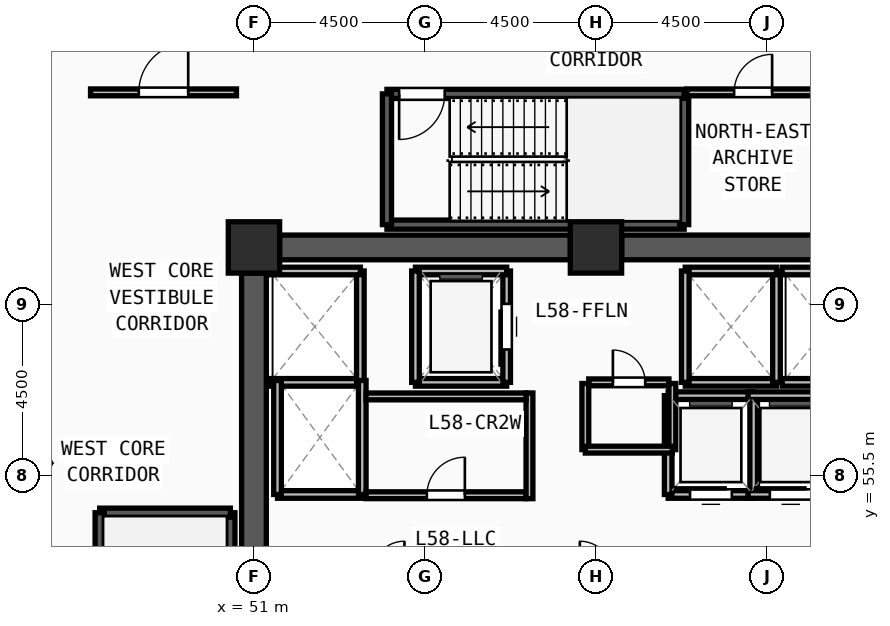
"""IFC4 building model, lengths in metres.
Left out: names, types, materials, properties, quantities, classifications, styles, units other than length and angle.
Written with IfcOpenShell. Run it as: python <this file> out.ifc"""

import sys

from ifc_helpers import new_model, si_unit, direction, frame, frame_2d, origin, origin_2d, place, context, subcontext, project, spatial, rectangle, extrude, source, transform, mapped, element, fill, save


model = new_model("IFC4")
c1 = context("Model", 3, precision=1e-05, world=origin(), true_north=direction((0.0, 1.0)))
c2 = subcontext(c1, "Body", "Model", "MODEL_VIEW")
j1 = project(units=[si_unit("LENGTHUNIT", "METRE"), si_unit("PLANEANGLEUNIT", "RADIAN")], contexts=[c1])
p1 = place(None, origin())
s1 = spatial("IfcSite", under=j1, at=p1, CompositionType="ELEMENT")
p2 = place(p1, origin())
s2 = spatial("IfcBuilding", under=s1, at=p2, CompositionType="ELEMENT")
p3 = place(p2, frame((0.0, 0.0, 224.25)))
s3 = spatial("IfcBuildingStorey", under=s2, at=p3, CompositionType="ELEMENT", Elevation=224.25)
m1 = source(origin(), c2, "Body", "SweptSolid", [
    extrude(rectangle(XDim=1.35, YDim=1.35, at=origin_2d()), origin(), (0.0, 0.0, 1.0), 3.75),
])
for number, where, z_axis, x_axis in (
    (1, (60.0, 61.5, 0.0), (0.0, 0.0, 1.0), (1.0, 0.0, 0.0)),
    (2, (51.0, 61.5, 0.0), (0.0, 0.0, 1.0), (1.0, 0.0, 0.0)),
):
    element("IfcColumn", number, at=place(p3, frame(where, z_axis=z_axis, x_axis=x_axis)), inside=s3, PredefinedType="COLUMN", context=c2, shape_type="MappedRepresentation", body=[
        mapped(m1, transform((0.0, 0.0, 0.0), x_axis=(1.0, 0.0, 0.0), y_axis=(0.0, 1.0, 0.0), z_axis=(0.0, 0.0, 1.0), scale=1.0)),
    ])
for number, where, z_axis, x_axis in (
    (3, (51.675, 61.5, 0.0), (0.0, 0.0, 1.0), (1.0, 0.0, 0.0)),
    (4, (60.675, 61.5, 0.0), (0.0, 0.0, 1.0), (1.0, 0.0, 0.0)),
):
    element("IfcWall", number, at=place(p3, frame(where, z_axis=z_axis, x_axis=x_axis)), inside=s3, PredefinedType="SHEAR", context=c2, shape_type="SweptSolid", body=[
        extrude(rectangle(XDim=7.65, YDim=0.65, at=frame_2d((3.825, 0.0))), origin(), (0.0, 0.0, 1.0), 3.57),
    ])
p4 = place(p3, frame((51.0, 47.175, 0.0), z_axis=(0.0, 0.0, 1.0), x_axis=(0.0, 1.0, 0.0)))
e5 = element("IfcWall", 5, at=p4, inside=s3, PredefinedType="SHEAR", context=c2, shape_type="SweptSolid", body=[
    extrude(rectangle(XDim=13.65, YDim=0.65, at=frame_2d((6.825, 0.0))), origin(), (0.0, 0.0, 1.0), 3.57),
])
p5 = place(p3, frame((50.38, 46.7, 0.0), z_axis=(0.0, 0.0, 1.0), x_axis=(0.0, 1.0, 0.0)))
e6 = element("IfcWall", 6, at=p5, inside=s3, PredefinedType="SOLIDWALL", context=c2, shape_type="SweptSolid", body=[
    extrude(rectangle(XDim=7.82, YDim=0.24, at=frame_2d((3.91, 0.0))), origin(), (0.0, 0.0, 1.0), 3.57),
])
p6 = place(p3, frame((50.38, 54.52, 0.0), z_axis=(0.0, 0.0, 1.0), x_axis=(-1.0, 0.0, 0.0)))
e7 = element("IfcWall", 7, at=p6, inside=s3, PredefinedType="SOLIDWALL", context=c2, shape_type="SweptSolid", body=[
    extrude(rectangle(XDim=3.44, YDim=0.24, at=frame_2d((1.72, 0.0))), origin(), (0.0, 0.0, 1.0), 3.57),
])
p7 = place(p3, frame((46.94, 54.52, 0.0), z_axis=(0.0, 0.0, 1.0), x_axis=(0.0, -1.0, 0.0)))
e8 = element("IfcWall", 8, at=p7, inside=s3, PredefinedType="SOLIDWALL", context=c2, shape_type="SweptSolid", body=[
    extrude(rectangle(XDim=7.82, YDim=0.24, at=frame_2d((3.91, 0.0))), origin(), (0.0, 0.0, 1.0), 3.57),
])
m2 = source(origin(), c2, "Body", "SweptSolid", [
    extrude(rectangle(XDim=1.2, YDim=2.2, at=frame_2d((0.6, 1.1))), frame((0.0, 0.13, 0.0), z_axis=(0.0, -1.0, 0.0), x_axis=(1.0, 0.0, 0.0)), (0.0, 0.0, 1.0), 0.26),
])
p8 = place(p7, frame((6.3, 0.0, 0.0)))
e9 = element("IfcOpeningElement", 9, at=p8, cuts=e8, PredefinedType="OPENING", context=c2, shape_type="MappedRepresentation", body=[
    mapped(m2, transform((0.0, 0.0, 0.0), x_axis=(1.0, 0.0, 0.0), y_axis=(0.0, 1.0, 0.0), z_axis=(0.0, 0.0, 1.0), scale=1.0)),
])
p9 = place(p3, frame((54.5, 62.1, 0.0), z_axis=(0.0, 0.0, 1.0), x_axis=(1.0, 0.0, 0.0)))
e10 = element("IfcWall", 10, at=p9, inside=s3, PredefinedType="SOLIDWALL", context=c2, shape_type="SweptSolid", body=[
    extrude(rectangle(XDim=7.82, YDim=0.24, at=frame_2d((3.91, 0.0))), origin(), (0.0, 0.0, 1.0), 3.57),
])
p10 = place(p3, frame((62.32, 62.1, 0.0), z_axis=(0.0, 0.0, 1.0), x_axis=(0.0, 1.0, 0.0)))
e11 = element("IfcWall", 11, at=p10, inside=s3, PredefinedType="SOLIDWALL", context=c2, shape_type="SweptSolid", body=[
    extrude(rectangle(XDim=3.44, YDim=0.24, at=frame_2d((1.72, 0.0))), origin(), (0.0, 0.0, 1.0), 3.57),
])
p11 = place(p3, frame((62.32, 65.54, 0.0), z_axis=(0.0, 0.0, 1.0), x_axis=(-1.0, 0.0, 0.0)))
e12 = element("IfcWall", 12, at=p11, inside=s3, PredefinedType="SOLIDWALL", context=c2, shape_type="SweptSolid", body=[
    extrude(rectangle(XDim=7.82, YDim=0.24, at=frame_2d((3.91, 0.0))), origin(), (0.0, 0.0, 1.0), 3.57),
])
p12 = place(p11, frame((6.3, 0.0, 0.0)))
e13 = element("IfcOpeningElement", 13, at=p12, cuts=e12, PredefinedType="OPENING", context=c2, shape_type="MappedRepresentation", body=[
    mapped(m2, transform((0.0, 0.0, 0.0), x_axis=(1.0, 0.0, 0.0), y_axis=(0.0, 1.0, 0.0), z_axis=(0.0, 0.0, 1.0), scale=1.0)),
])
p13 = place(p3, frame((54.5, 65.54, 0.0), z_axis=(0.0, 0.0, 1.0), x_axis=(0.0, -1.0, 0.0)))
e14 = element("IfcWall", 14, at=p13, inside=s3, PredefinedType="SOLIDWALL", context=c2, shape_type="SweptSolid", body=[
    extrude(rectangle(XDim=3.44, YDim=0.24, at=frame_2d((1.72, 0.0))), origin(), (0.0, 0.0, 1.0), 3.57),
])
p14 = place(p3, frame((55.25, 57.95, 0.0), z_axis=(0.0, 0.0, 1.0), x_axis=(1.0, 0.0, 0.0)))
e15 = element("IfcWall", 15, at=p14, inside=s3, PredefinedType="SOLIDWALL", context=c2, shape_type="SweptSolid", body=[
    extrude(rectangle(XDim=2.4, YDim=0.2, at=frame_2d((1.2, 0.0))), origin(), (0.0, 0.0, 1.0), 3.57),
])
p15 = place(p3, frame((57.65, 57.95, 0.0), z_axis=(0.0, 0.0, 1.0), x_axis=(0.0, 1.0, 0.0)))
e16 = element("IfcWall", 16, at=p15, inside=s3, PredefinedType="SOLIDWALL", context=c2, shape_type="SweptSolid", body=[
    extrude(rectangle(XDim=2.93, YDim=0.2, at=frame_2d((1.465, 0.0))), origin(), (0.0, 0.0, 1.0), 3.57),
])
m3 = source(origin(), c2, "Body", "SweptSolid", [
    extrude(rectangle(XDim=1.2, YDim=2.3, at=frame_2d((0.6, 1.15))), frame((0.0, 0.11, 0.0), z_axis=(0.0, -1.0, 0.0), x_axis=(1.0, 0.0, 0.0)), (0.0, 0.0, 1.0), 0.22),
])
p16 = place(p15, frame((0.865, 0.0, 0.0)))
e17 = element("IfcOpeningElement", 17, at=p16, cuts=e16, PredefinedType="OPENING", context=c2, shape_type="MappedRepresentation", body=[
    mapped(m3, transform((0.0, 0.0, 0.0), x_axis=(1.0, 0.0, 0.0), y_axis=(0.0, 1.0, 0.0), z_axis=(0.0, 0.0, 1.0), scale=1.0)),
])
p17 = place(p3, frame((57.65, 60.88, 0.0), z_axis=(0.0, 0.0, 1.0), x_axis=(-1.0, 0.0, 0.0)))
e18 = element("IfcWall", 18, at=p17, inside=s3, PredefinedType="SOLIDWALL", context=c2, shape_type="SweptSolid", body=[
    extrude(rectangle(XDim=2.4, YDim=0.2, at=frame_2d((1.2, 0.0))), origin(), (0.0, 0.0, 1.0), 3.57),
])
p18 = place(p3, frame((55.25, 60.88, 0.0), z_axis=(0.0, 0.0, 1.0), x_axis=(0.0, -1.0, 0.0)))
e19 = element("IfcWall", 19, at=p18, inside=s3, PredefinedType="SOLIDWALL", context=c2, shape_type="SweptSolid", body=[
    extrude(rectangle(XDim=2.93, YDim=0.2, at=frame_2d((1.465, 0.0))), origin(), (0.0, 0.0, 1.0), 3.57),
])
p19 = place(p3, frame((62.35, 57.95, 0.0), z_axis=(0.0, 0.0, 1.0), x_axis=(1.0, 0.0, 0.0)))
e20 = element("IfcWall", 20, at=p19, inside=s3, PredefinedType="SOLIDWALL", context=c2, shape_type="SweptSolid", body=[
    extrude(rectangle(XDim=2.4, YDim=0.2, at=frame_2d((1.2, 0.0))), origin(), (0.0, 0.0, 1.0), 3.57),
])
p20 = place(p3, frame((64.75, 57.95, 0.0), z_axis=(0.0, 0.0, 1.0), x_axis=(0.0, 1.0, 0.0)))
e21 = element("IfcWall", 21, at=p20, inside=s3, PredefinedType="SOLIDWALL", context=c2, shape_type="SweptSolid", body=[
    extrude(rectangle(XDim=2.93, YDim=0.2, at=frame_2d((1.465, 0.0))), origin(), (0.0, 0.0, 1.0), 3.57),
])
p21 = place(p3, frame((64.75, 60.88, 0.0), z_axis=(0.0, 0.0, 1.0), x_axis=(-1.0, 0.0, 0.0)))
e22 = element("IfcWall", 22, at=p21, inside=s3, PredefinedType="SOLIDWALL", context=c2, shape_type="SweptSolid", body=[
    extrude(rectangle(XDim=2.4, YDim=0.2, at=frame_2d((1.2, 0.0))), origin(), (0.0, 0.0, 1.0), 3.57),
])
p22 = place(p3, frame((62.35, 60.88, 0.0), z_axis=(0.0, 0.0, 1.0), x_axis=(0.0, -1.0, 0.0)))
e23 = element("IfcWall", 23, at=p22, inside=s3, PredefinedType="SOLIDWALL", context=c2, shape_type="SweptSolid", body=[
    extrude(rectangle(XDim=2.93, YDim=0.2, at=frame_2d((1.465, 0.0))), origin(), (0.0, 0.0, 1.0), 3.57),
])
for number, where, z_axis, x_axis in (
    (24, (64.9, 57.95, 0.0), (0.0, 0.0, 1.0), (1.0, 0.0, 0.0)),
    (25, (67.3, 60.88, 0.0), (0.0, 0.0, 1.0), (-1.0, 0.0, 0.0)),
    (26, (51.4, 57.95, 0.0), (0.0, 0.0, 1.0), (1.0, 0.0, 0.0)),
):
    element("IfcWall", number, at=place(p3, frame(where, z_axis=z_axis, x_axis=x_axis)), inside=s3, PredefinedType="SOLIDWALL", context=c2, shape_type="SweptSolid", body=[
        extrude(rectangle(XDim=2.4, YDim=0.2, at=frame_2d((1.2, 0.0))), origin(), (0.0, 0.0, 1.0), 3.57),
    ])
p23 = place(p3, frame((53.8, 57.95, 0.0), z_axis=(0.0, 0.0, 1.0), x_axis=(0.0, 1.0, 0.0)))
e27 = element("IfcWall", 27, at=p23, inside=s3, PredefinedType="SOLIDWALL", context=c2, shape_type="SweptSolid", body=[
    extrude(rectangle(XDim=2.93, YDim=0.2, at=frame_2d((1.465, 0.0))), origin(), (0.0, 0.0, 1.0), 3.57),
])
p24 = place(p3, frame((53.8, 60.88, 0.0), z_axis=(0.0, 0.0, 1.0), x_axis=(-1.0, 0.0, 0.0)))
e28 = element("IfcWall", 28, at=p24, inside=s3, PredefinedType="SOLIDWALL", context=c2, shape_type="SweptSolid", body=[
    extrude(rectangle(XDim=2.4, YDim=0.2, at=frame_2d((1.2, 0.0))), origin(), (0.0, 0.0, 1.0), 3.57),
])
p25 = place(p3, frame((51.62, 55.0, 0.0), z_axis=(0.0, 0.0, 1.0), x_axis=(1.0, 0.0, 0.0)))
e29 = element("IfcWall", 29, at=p25, inside=s3, PredefinedType="SOLIDWALL", context=c2, shape_type="SweptSolid", body=[
    extrude(rectangle(XDim=2.23, YDim=0.2, at=frame_2d((1.115, 0.0))), origin(), (0.0, 0.0, 1.0), 3.57),
])
for number, where, z_axis, x_axis in (
    (30, (53.85, 55.0, 0.0), (0.0, 0.0, 1.0), (0.0, 1.0, 0.0)),
    (31, (51.62, 58.0, 0.0), (0.0, 0.0, 1.0), (0.0, -1.0, 0.0)),
):
    element("IfcWall", number, at=place(p3, frame(where, z_axis=z_axis, x_axis=x_axis)), inside=s3, PredefinedType="SOLIDWALL", context=c2, shape_type="SweptSolid", body=[
        extrude(rectangle(XDim=3.0, YDim=0.2, at=frame_2d((1.5, 0.0))), origin(), (0.0, 0.0, 1.0), 3.57),
    ])
p26 = place(p3, frame((61.9, 55.0, 0.0), z_axis=(0.0, 0.0, 1.0), x_axis=(1.0, 0.0, 0.0)))
e32 = element("IfcWall", 32, at=p26, inside=s3, PredefinedType="SOLIDWALL", context=c2, shape_type="SweptSolid", body=[
    extrude(rectangle(XDim=2.25, YDim=0.2, at=frame_2d((1.125, 0.0))), origin(), (0.0, 0.0, 1.0), 3.57),
])
m4 = source(origin(), c2, "Body", "SweptSolid", [
    extrude(rectangle(XDim=1.1, YDim=2.2, at=frame_2d((0.55, 1.1))), frame((0.0, 0.11, 0.0), z_axis=(0.0, -1.0, 0.0), x_axis=(1.0, 0.0, 0.0)), (0.0, 0.0, 1.0), 0.22),
])
p27 = place(p26, frame((0.575, 0.0, 0.0)))
e33 = element("IfcOpeningElement", 33, at=p27, cuts=e32, PredefinedType="OPENING", context=c2, shape_type="MappedRepresentation", body=[
    mapped(m4, transform((0.0, 0.0, 0.0), x_axis=(1.0, 0.0, 0.0), y_axis=(0.0, 1.0, 0.0), z_axis=(0.0, 0.0, 1.0), scale=1.0)),
])
p28 = place(p3, frame((64.15, 55.0, 0.0), z_axis=(0.0, 0.0, 1.0), x_axis=(0.0, 1.0, 0.0)))
e34 = element("IfcWall", 34, at=p28, inside=s3, PredefinedType="SOLIDWALL", context=c2, shape_type="SweptSolid", body=[
    extrude(rectangle(XDim=2.6, YDim=0.2, at=frame_2d((1.3, 0.0))), origin(), (0.0, 0.0, 1.0), 3.57),
])
p29 = place(p3, frame((64.15, 57.6, 0.0), z_axis=(0.0, 0.0, 1.0), x_axis=(-1.0, 0.0, 0.0)))
e35 = element("IfcWall", 35, at=p29, inside=s3, PredefinedType="SOLIDWALL", context=c2, shape_type="SweptSolid", body=[
    extrude(rectangle(XDim=2.25, YDim=0.2, at=frame_2d((1.125, 0.0))), origin(), (0.0, 0.0, 1.0), 3.57),
])
p30 = place(p3, frame((61.9, 57.6, 0.0), z_axis=(0.0, 0.0, 1.0), x_axis=(0.0, -1.0, 0.0)))
e36 = element("IfcWall", 36, at=p30, inside=s3, PredefinedType="SOLIDWALL", context=c2, shape_type="SweptSolid", body=[
    extrude(rectangle(XDim=2.6, YDim=0.2, at=frame_2d((1.3, 0.0))), origin(), (0.0, 0.0, 1.0), 3.57),
])
p31 = place(p3, frame((64.0, 55.0, 0.0), z_axis=(0.0, 0.0, 1.0), x_axis=(1.0, 0.0, 0.0)))
e37 = element("IfcWall", 37, at=p31, inside=s3, PredefinedType="SOLIDWALL", context=c2, shape_type="SweptSolid", body=[
    extrude(rectangle(XDim=2.25, YDim=0.2, at=frame_2d((1.125, 0.0))), origin(), (0.0, 0.0, 1.0), 3.57),
])
p32 = place(p31, frame((0.575, 0.0, 0.0)))
e38 = element("IfcOpeningElement", 38, at=p32, cuts=e37, PredefinedType="OPENING", context=c2, shape_type="MappedRepresentation", body=[
    mapped(m4, transform((0.0, 0.0, 0.0), x_axis=(1.0, 0.0, 0.0), y_axis=(0.0, 1.0, 0.0), z_axis=(0.0, 0.0, 1.0), scale=1.0)),
])
p33 = place(p3, frame((66.25, 57.6, 0.0), z_axis=(0.0, 0.0, 1.0), x_axis=(-1.0, 0.0, 0.0)))
e39 = element("IfcWall", 39, at=p33, inside=s3, PredefinedType="SOLIDWALL", context=c2, shape_type="SweptSolid", body=[
    extrude(rectangle(XDim=2.25, YDim=0.2, at=frame_2d((1.125, 0.0))), origin(), (0.0, 0.0, 1.0), 3.57),
])
p34 = place(p3, frame((53.95, 54.98, 0.0), z_axis=(0.0, 0.0, 1.0), x_axis=(1.0, 0.0, 0.0)))
e40 = element("IfcWall", 40, at=p34, inside=s3, PredefinedType="PARTITIONING", context=c2, shape_type="SweptSolid", body=[
    extrude(rectangle(XDim=4.21, YDim=0.18, at=frame_2d((2.105, 0.0))), origin(), (0.0, 0.0, 1.0), 3.57),
])
m5 = source(origin(), c2, "Body", "SweptSolid", [
    extrude(rectangle(XDim=1.0, YDim=2.2, at=frame_2d((0.5, 1.1))), frame((0.0, 0.1, 0.0), z_axis=(0.0, -1.0, 0.0), x_axis=(1.0, 0.0, 0.0)), (0.0, 0.0, 1.0), 0.2),
])
p35 = place(p34, frame((1.6, 0.0, 0.0)))
e41 = element("IfcOpeningElement", 41, at=p35, cuts=e40, PredefinedType="OPENING", context=c2, shape_type="MappedRepresentation", body=[
    mapped(m5, transform((0.0, 0.0, 0.0), x_axis=(1.0, 0.0, 0.0), y_axis=(0.0, 1.0, 0.0), z_axis=(0.0, 0.0, 1.0), scale=1.0)),
])
p36 = place(p3, frame((59.81, 57.95, 0.0), z_axis=(0.0, 0.0, 1.0), x_axis=(1.0, 0.0, 0.0)))
e42 = element("IfcWall", 42, at=p36, inside=s3, PredefinedType="PARTITIONING", context=c2, shape_type="SweptSolid", body=[
    extrude(rectangle(XDim=2.11, YDim=0.18, at=frame_2d((1.055, 0.0))), origin(), (0.0, 0.0, 1.0), 3.57),
])
m6 = source(origin(), c2, "Body", "SweptSolid", [
    extrude(rectangle(XDim=0.85, YDim=2.1, at=frame_2d((0.425, 1.05))), frame((0.0, 0.1, 0.0), z_axis=(0.0, -1.0, 0.0), x_axis=(1.0, 0.0, 0.0)), (0.0, 0.0, 1.0), 0.2),
])
p37 = place(p36, frame((0.635, 0.0, 0.0)))
e43 = element("IfcOpeningElement", 43, at=p37, cuts=e42, PredefinedType="OPENING", context=c2, shape_type="MappedRepresentation", body=[
    mapped(m6, transform((0.0, 0.0, 0.0), x_axis=(1.0, 0.0, 0.0), y_axis=(0.0, 1.0, 0.0), z_axis=(0.0, 0.0, 1.0), scale=1.0)),
])
p38 = place(p3, frame((62.39, 65.58, 0.0), z_axis=(0.0, 0.0, 1.0), x_axis=(1.0, 0.0, 0.0)))
e44 = element("IfcWall", 44, at=p38, inside=s3, PredefinedType="PARTITIONING", context=c2, shape_type="SweptSolid", body=[
    extrude(rectangle(XDim=3.49, YDim=0.18, at=frame_2d((1.745, 0.0))), origin(), (0.0, 0.0, 1.0), 3.57),
])
p39 = place(p38, frame((1.245, 0.0, 0.0)))
e45 = element("IfcOpeningElement", 45, at=p39, cuts=e44, PredefinedType="OPENING", context=c2, shape_type="MappedRepresentation", body=[
    mapped(m5, transform((0.0, 0.0, 0.0), x_axis=(1.0, 0.0, 0.0), y_axis=(0.0, 1.0, 0.0), z_axis=(0.0, 0.0, 1.0), scale=1.0)),
])
p40 = place(p3, frame((46.7, 65.58, 0.0), z_axis=(0.0, 0.0, 1.0), x_axis=(1.0, 0.0, 0.0)))
e46 = element("IfcWall", 46, at=p40, inside=s3, PredefinedType="PARTITIONING", context=c2, shape_type="SweptSolid", body=[
    extrude(rectangle(XDim=3.84, YDim=0.18, at=frame_2d((1.92, 0.0))), origin(), (0.0, 0.0, 1.0), 3.57),
])
m7 = source(origin(), c2, "Body", "SweptSolid", [
    extrude(rectangle(XDim=1.3, YDim=2.2, at=frame_2d((0.65, 1.1))), frame((0.0, 0.1, 0.0), z_axis=(0.0, -1.0, 0.0), x_axis=(1.0, 0.0, 0.0)), (0.0, 0.0, 1.0), 0.2),
])
p41 = place(p40, frame((1.27, 0.0, 0.0)))
e47 = element("IfcOpeningElement", 47, at=p41, cuts=e46, PredefinedType="OPENING", context=c2, shape_type="MappedRepresentation", body=[
    mapped(m7, transform((0.0, 0.0, 0.0), x_axis=(1.0, 0.0, 0.0), y_axis=(0.0, 1.0, 0.0), z_axis=(0.0, 0.0, 1.0), scale=1.0)),
])
for number, where, z_axis, x_axis in (
    (48, (59.72, 56.18, 0.0), (0.0, 0.0, 1.0), (0.0, 1.0, 0.0)),
    (49, (62.01, 56.18, 0.0), (0.0, 0.0, 1.0), (0.0, 1.0, 0.0)),
):
    element("IfcWall", number, at=place(p3, frame(where, z_axis=z_axis, x_axis=x_axis)), inside=s3, PredefinedType="PARTITIONING", context=c2, shape_type="SweptSolid", body=[
        extrude(rectangle(XDim=1.74, YDim=0.18, at=frame_2d((0.87, 0.0))), origin(), (0.0, 0.0, 1.0), 3.57),
    ])
p42 = place(p3, frame((59.72, 56.18, 0.0), z_axis=(0.0, 0.0, 1.0), x_axis=(1.0, 0.0, 0.0)))
e50 = element("IfcWall", 50, at=p42, inside=s3, PredefinedType="PARTITIONING", context=c2, shape_type="SweptSolid", body=[
    extrude(rectangle(XDim=2.29, YDim=0.18, at=frame_2d((1.145, 0.0))), origin(), (0.0, 0.0, 1.0), 3.57),
])
p43 = place(p3, frame((58.25, 54.89, 0.0), z_axis=(0.0, 0.0, 1.0), x_axis=(0.0, 1.0, 0.0)))
e51 = element("IfcWall", 51, at=p43, inside=s3, PredefinedType="PARTITIONING", context=c2, shape_type="SweptSolid", body=[
    extrude(rectangle(XDim=2.78, YDim=0.18, at=frame_2d((1.39, 0.0))), origin(), (0.0, 0.0, 1.0), 3.57),
])
p44 = place(p3, frame((53.95, 57.58, 0.0), z_axis=(0.0, 0.0, 1.0), x_axis=(1.0, 0.0, 0.0)))
e52 = element("IfcWall", 52, at=p44, inside=s3, PredefinedType="PARTITIONING", context=c2, shape_type="SweptSolid", body=[
    extrude(rectangle(XDim=4.21, YDim=0.18, at=frame_2d((2.105, 0.0))), origin(), (0.0, 0.0, 1.0), 3.57),
])
m8 = source(origin(), c2, "Body", "SweptSolid", [
    extrude(rectangle(XDim=1.2, YDim=2.2, at=frame_2d((0.6, 1.1))), frame((0.0, 0.025, 0.0), z_axis=(0.0, -1.0, 0.0), x_axis=(1.0, 0.0, 0.0)), (0.0, 0.0, 1.0), 0.05),
])
p45 = place(p12, origin())
e53 = element("IfcDoor", 53, at=p45, inside=s3, OperationType="SINGLE_SWING_RIGHT", PredefinedType="DOOR", context=c2, shape_type="MappedRepresentation", body=[
    mapped(m8, transform((0.0, 0.0, 0.0), x_axis=(1.0, 0.0, 0.0), y_axis=(0.0, 1.0, 0.0), z_axis=(0.0, 0.0, 1.0), scale=1.0)),
])
fill(e13, e53)
m9 = source(origin(), c2, "Body", "SweptSolid", [
    extrude(rectangle(XDim=1.2, YDim=2.3, at=frame_2d((0.6, 1.15))), frame((0.0, 0.025, 0.0), z_axis=(0.0, -1.0, 0.0), x_axis=(1.0, 0.0, 0.0)), (0.0, 0.0, 1.0), 0.05),
])
p46 = place(p16, origin())
e54 = element("IfcDoor", 54, at=p46, inside=s3, OperationType="SLIDING_TO_LEFT", PredefinedType="DOOR", context=c2, shape_type="MappedRepresentation", body=[
    mapped(m9, transform((0.0, 0.0, 0.0), x_axis=(1.0, 0.0, 0.0), y_axis=(0.0, 1.0, 0.0), z_axis=(0.0, 0.0, 1.0), scale=1.0)),
])
fill(e17, e54)
m10 = source(origin(), c2, "Body", "SweptSolid", [
    extrude(rectangle(XDim=1.1, YDim=2.2, at=frame_2d((0.55, 1.1))), frame((0.0, 0.025, 0.0), z_axis=(0.0, -1.0, 0.0), x_axis=(1.0, 0.0, 0.0)), (0.0, 0.0, 1.0), 0.05),
])
p47 = place(p27, origin())
e55 = element("IfcDoor", 55, at=p47, inside=s3, OperationType="SLIDING_TO_LEFT", PredefinedType="DOOR", context=c2, shape_type="MappedRepresentation", body=[
    mapped(m10, transform((0.0, 0.0, 0.0), x_axis=(1.0, 0.0, 0.0), y_axis=(0.0, 1.0, 0.0), z_axis=(0.0, 0.0, 1.0), scale=1.0)),
])
fill(e33, e55)
p48 = place(p32, origin())
e56 = element("IfcDoor", 56, at=p48, inside=s3, OperationType="SLIDING_TO_LEFT", PredefinedType="DOOR", context=c2, shape_type="MappedRepresentation", body=[
    mapped(m10, transform((0.0, 0.0, 0.0), x_axis=(1.0, 0.0, 0.0), y_axis=(0.0, 1.0, 0.0), z_axis=(0.0, 0.0, 1.0), scale=1.0)),
])
fill(e38, e56)
m11 = source(origin(), c2, "Body", "SweptSolid", [
    extrude(rectangle(XDim=1.0, YDim=2.2, at=frame_2d((0.5, 1.1))), frame((0.0, 0.025, 0.0), z_axis=(0.0, -1.0, 0.0), x_axis=(1.0, 0.0, 0.0)), (0.0, 0.0, 1.0), 0.05),
])
p49 = place(p35, origin())
e57 = element("IfcDoor", 57, at=p49, inside=s3, OperationType="SINGLE_SWING_RIGHT", PredefinedType="DOOR", context=c2, shape_type="MappedRepresentation", body=[
    mapped(m11, transform((0.0, 0.0, 0.0), x_axis=(1.0, 0.0, 0.0), y_axis=(0.0, 1.0, 0.0), z_axis=(0.0, 0.0, 1.0), scale=1.0)),
])
fill(e41, e57)
m12 = source(origin(), c2, "Body", "SweptSolid", [
    extrude(rectangle(XDim=0.85, YDim=2.1, at=frame_2d((0.425, 1.05))), frame((0.0, 0.025, 0.0), z_axis=(0.0, -1.0, 0.0), x_axis=(1.0, 0.0, 0.0)), (0.0, 0.0, 1.0), 0.05),
])
p50 = place(p37, origin())
e58 = element("IfcDoor", 58, at=p50, inside=s3, OperationType="SINGLE_SWING_LEFT", PredefinedType="DOOR", context=c2, shape_type="MappedRepresentation", body=[
    mapped(m12, transform((0.0, 0.0, 0.0), x_axis=(1.0, 0.0, 0.0), y_axis=(0.0, 1.0, 0.0), z_axis=(0.0, 0.0, 1.0), scale=1.0)),
])
fill(e43, e58)
p51 = place(p39, origin())
e59 = element("IfcDoor", 59, at=p51, inside=s3, OperationType="SINGLE_SWING_RIGHT", PredefinedType="DOOR", context=c2, shape_type="MappedRepresentation", body=[
    mapped(m11, transform((0.0, 0.0, 0.0), x_axis=(1.0, 0.0, 0.0), y_axis=(0.0, 1.0, 0.0), z_axis=(0.0, 0.0, 1.0), scale=1.0)),
])
fill(e45, e59)
m13 = source(origin(), c2, "Body", "SweptSolid", [
    extrude(rectangle(XDim=1.3, YDim=2.2, at=frame_2d((0.65, 1.1))), frame((0.0, 0.025, 0.0), z_axis=(0.0, -1.0, 0.0), x_axis=(1.0, 0.0, 0.0)), (0.0, 0.0, 1.0), 0.05),
])
p52 = place(p41, origin())
e60 = element("IfcDoor", 60, at=p52, inside=s3, OperationType="SINGLE_SWING_RIGHT", PredefinedType="DOOR", context=c2, shape_type="MappedRepresentation", body=[
    mapped(m13, transform((0.0, 0.0, 0.0), x_axis=(1.0, 0.0, 0.0), y_axis=(0.0, 1.0, 0.0), z_axis=(0.0, 0.0, 1.0), scale=1.0)),
])
fill(e47, e60)
save(model, sys.argv[1])
